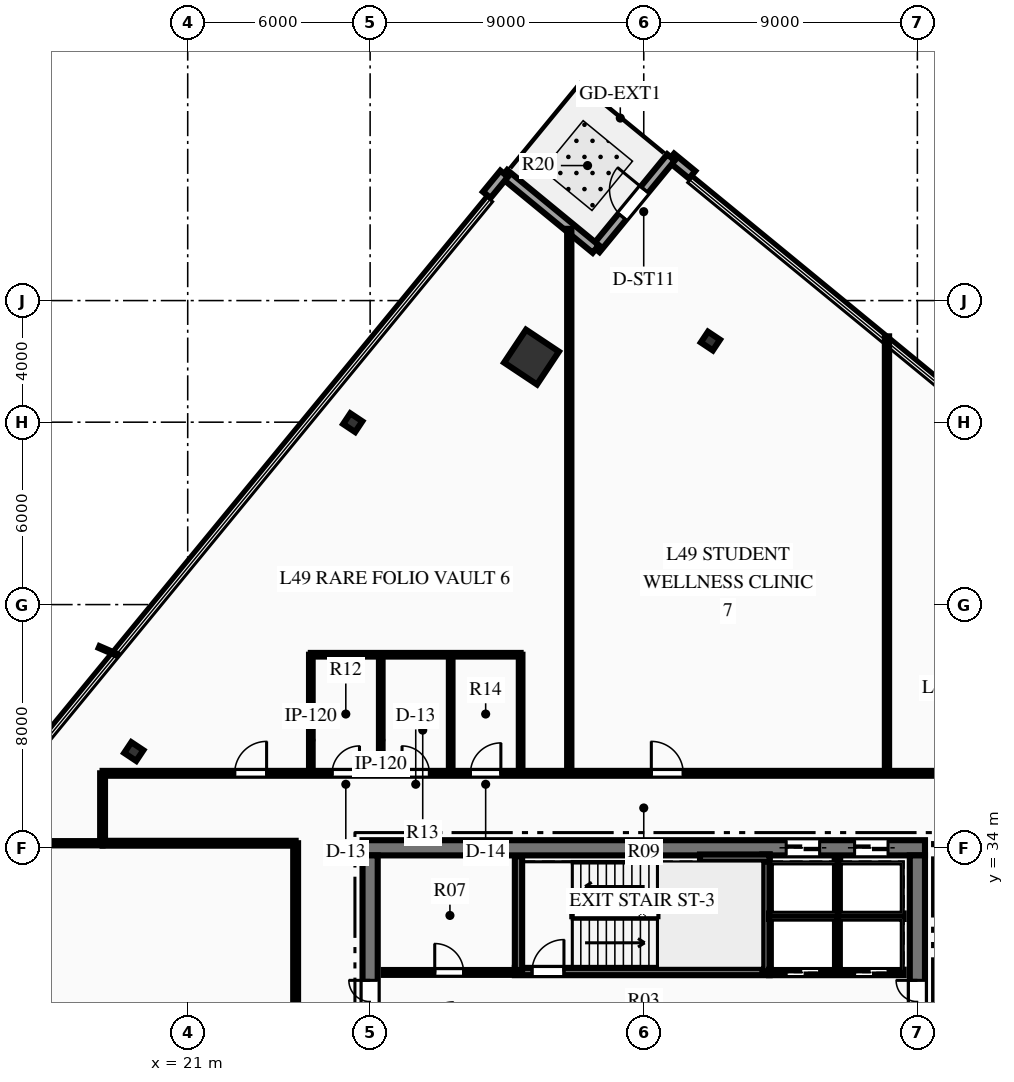
"""IFC4 building model, lengths in metres.
Left out: names, types, materials, properties, quantities, classifications, styles, units other than length and angle.
Written with IfcOpenShell. Run it as: python <this file> out.ifc"""

import sys

from ifc_helpers import new_model, si_unit, direction, frame, frame_2d, origin, origin_2d, place, context, subcontext, project, spatial, rectangle, hollow_rectangle, i_section, extrude, element, fill, save


model = new_model("IFC4")
c1 = context("Model", 3, precision=1e-05, world=origin(), true_north=direction((0.0, 1.0)))
c2 = subcontext(c1, "Body", "Model", "MODEL_VIEW")
j1 = project(units=[si_unit("LENGTHUNIT", "METRE"), si_unit("PLANEANGLEUNIT", "RADIAN")], contexts=[c1])
p1 = place(None, origin())
s1 = spatial("IfcSite", under=j1, at=p1, CompositionType="ELEMENT")
p2 = place(p1, origin())
s2 = spatial("IfcBuilding", under=s1, at=p2, CompositionType="ELEMENT")
p3 = place(p2, frame((0.0, 0.0, 198.45)))
s3 = spatial("IfcBuildingStorey", under=s2, at=p3, CompositionType="ELEMENT", Elevation=198.45)
p4 = place(p3, frame((26.75, 34.0, 0.0), z_axis=(0.0, 0.0, 1.0), x_axis=(1.0, 0.0, 0.0)))
e1 = element("IfcWall", 1, at=p4, inside=s3, PredefinedType="SHEAR", context=c2, shape_type="SweptSolid", body=[
    extrude(rectangle(XDim=18.5, YDim=0.5, at=frame_2d((9.25, 0.0))), origin(), (0.0, 0.0, 1.0), 3.75),
])
p5 = place(p4, frame((13.935, 0.0, 0.0)))
e2 = element("IfcOpeningElement", 2, at=p5, cuts=e1, PredefinedType="OPENING", context=c2, shape_type="SweptSolid", body=[
    extrude(rectangle(XDim=1.1, YDim=2.15, at=frame_2d((0.55, 1.075))), frame((0.0, 0.26, 0.0), z_axis=(0.0, -1.0, 0.0), x_axis=(1.0, 0.0, 0.0)), (0.0, 0.0, 1.0), 0.52),
])
p6 = place(p4, frame((16.185, 0.0, 0.0)))
e3 = element("IfcOpeningElement", 3, at=p6, cuts=e1, PredefinedType="OPENING", context=c2, shape_type="SweptSolid", body=[
    extrude(rectangle(XDim=1.1, YDim=2.15, at=frame_2d((0.55, 1.075))), frame((0.0, 0.26, 0.0), z_axis=(0.0, -1.0, 0.0), x_axis=(1.0, 0.0, 0.0)), (0.0, 0.0, 1.0), 0.52),
])
p7 = place(p3, frame((27.0, 18.25, 0.0), z_axis=(0.0, 0.0, 1.0), x_axis=(0.0, 1.0, 0.0)))
e4 = element("IfcWall", 4, at=p7, inside=s3, PredefinedType="SHEAR", context=c2, shape_type="SweptSolid", body=[
    extrude(rectangle(XDim=15.5, YDim=0.5, at=frame_2d((7.75, 0.0))), origin(), (0.0, 0.0, 1.0), 3.75),
])
p8 = place(p7, frame((9.99, 0.0, 0.0)))
e5 = element("IfcOpeningElement", 5, at=p8, cuts=e4, PredefinedType="OPENING", context=c2, shape_type="SweptSolid", body=[
    extrude(rectangle(XDim=1.4, YDim=2.2, at=frame_2d((0.7, 1.1))), frame((0.0, 0.26, 0.0), z_axis=(0.0, -1.0, 0.0), x_axis=(1.0, 0.0, 0.0)), (0.0, 0.0, 1.0), 0.52),
])
p9 = place(p3, frame((45.0, 18.25, 0.0), z_axis=(0.0, 0.0, 1.0), x_axis=(0.0, 1.0, 0.0)))
e6 = element("IfcWall", 6, at=p9, inside=s3, PredefinedType="SHEAR", context=c2, shape_type="SweptSolid", body=[
    extrude(rectangle(XDim=15.5, YDim=0.5, at=frame_2d((7.75, 0.0))), origin(), (0.0, 0.0, 1.0), 3.75),
])
p10 = place(p9, frame((9.99, 0.0, 0.0)))
e7 = element("IfcOpeningElement", 7, at=p10, cuts=e6, PredefinedType="OPENING", context=c2, shape_type="SweptSolid", body=[
    extrude(rectangle(XDim=1.4, YDim=2.2, at=frame_2d((0.7, 1.1))), frame((0.0, 0.26, 0.0), z_axis=(0.0, -1.0, 0.0), x_axis=(1.0, 0.0, 0.0)), (0.0, 0.0, 1.0), 0.52),
])
p11 = place(p3, frame((31.76, 29.93, 0.0), z_axis=(0.0, 0.0, 1.0), x_axis=(1.0, 0.0, 0.0)))
e8 = element("IfcWall", 8, at=p11, inside=s3, PredefinedType="SHEAR", context=c2, shape_type="SweptSolid", body=[
    extrude(rectangle(XDim=8.38, YDim=0.24, at=frame_2d((4.19, 0.0))), origin(), (0.0, 0.0, 1.0), 3.75),
])
p12 = place(p11, frame((0.565, 0.0, 0.0)))
e9 = element("IfcOpeningElement", 9, at=p12, cuts=e8, PredefinedType="OPENING", context=c2, shape_type="SweptSolid", body=[
    extrude(rectangle(XDim=1.05, YDim=2.15, at=frame_2d((0.525, 1.075))), frame((0.0, 0.13, 0.0), z_axis=(0.0, -1.0, 0.0), x_axis=(1.0, 0.0, 0.0)), (0.0, 0.0, 1.0), 0.26),
])
p13 = place(p3, frame((31.88, 29.93, 0.0), z_axis=(0.0, 0.0, 1.0), x_axis=(0.0, 1.0, 0.0)))
e10 = element("IfcWall", 10, at=p13, inside=s3, PredefinedType="SHEAR", context=c2, shape_type="SweptSolid", body=[
    extrude(rectangle(XDim=3.79, YDim=0.24, at=frame_2d((1.895, 0.0))), origin(), (0.0, 0.0, 1.0), 3.75),
])
p14 = place(p3, frame((40.02, 29.93, 0.0), z_axis=(0.0, 0.0, 1.0), x_axis=(0.0, 1.0, 0.0)))
e11 = element("IfcWall", 11, at=p14, inside=s3, PredefinedType="SHEAR", context=c2, shape_type="SweptSolid", body=[
    extrude(rectangle(XDim=3.85, YDim=0.24, at=frame_2d((1.925, 0.0))), origin(), (0.0, 0.0, 1.0), 3.75),
])
p15 = place(p3, frame((37.85, 33.66, 0.0), z_axis=(0.0, 0.0, 1.0), x_axis=(1.0, 0.0, 0.0)))
e12 = element("IfcWall", 12, at=p15, inside=s3, PredefinedType="SHEAR", context=c2, shape_type="SweptSolid", body=[
    extrude(rectangle(XDim=2.29, YDim=0.24, at=frame_2d((1.145, 0.0))), origin(), (0.0, 0.0, 1.0), 3.75),
])
p16 = place(p3, frame((32.308, 50.141, 0.0), z_axis=(0.0, 0.0, 1.0), x_axis=(0.554118199338, 0.832437998389, 0.0)))
e13 = element("IfcColumn", 13, at=p16, inside=s3, PredefinedType="COLUMN", context=c2, shape_type="SweptSolid", body=[
    extrude(hollow_rectangle(XDim=1.3, YDim=1.3, WallThickness=0.06, at=origin_2d()), origin(), (0.0, 0.0, 1.0), 3.75),
])
for number, where, z_axis, x_axis in (
    (14, (38.193, 50.668, 0.0), (0.0, 0.0, 1.0), (0.554, 0.832, 0.0)),
    (15, (26.428, 47.984, 0.0), (0.0, 0.0, 1.0), (0.554, 0.832, 0.0)),
    (16, (19.226, 37.166, 0.0), (0.0, 0.0, 1.0), (0.554, 0.832, 0.0)),
):
    element("IfcColumn", number, at=place(p3, frame(where, z_axis=z_axis, x_axis=x_axis)), inside=s3, PredefinedType="COLUMN", context=c2, shape_type="SweptSolid", body=[
        extrude(i_section(OverallWidth=0.424, OverallDepth=0.474, WebThickness=0.048, FlangeThickness=0.077, at=origin_2d()), origin(), (0.0, 0.0, 1.0), 3.75),
    ])
p17 = place(p3, frame((36.896, 56.71, 0.0), z_axis=(0.0, 0.0, 1.0), x_axis=(0.772759512761, -0.63469893291, 0.0)))
e17 = element("IfcWall", 17, at=p17, inside=s3, PredefinedType="STANDARD", context=c2, shape_type="SweptSolid", body=[
    extrude(rectangle(XDim=0.9, YDim=0.32, at=frame_2d((0.45, 0.0))), origin(), (0.0, 0.0, 1.0), 3.47),
])
p18 = place(p3, frame((34.421, 53.697, 0.0), z_axis=(0.0, 0.0, 1.0), x_axis=(0.634712723343, 0.77274818591, 0.0)))
e18 = element("IfcWall", 18, at=p18, inside=s3, PredefinedType="STANDARD", context=c2, shape_type="SweptSolid", body=[
    extrude(rectangle(XDim=3.9, YDim=0.32, at=frame_2d((1.95, 0.0))), origin(), (0.0, 0.0, 1.0), 3.47),
])
p19 = place(p18, frame((1.375, 0.0, 0.0)))
e19 = element("IfcOpeningElement", 19, at=p19, cuts=e18, PredefinedType="OPENING", context=c2, shape_type="SweptSolid", body=[
    extrude(rectangle(XDim=1.15, YDim=2.2, at=frame_2d((0.575, 1.1))), frame((0.0, 0.17, 0.0), z_axis=(0.0, -1.0, 0.0), x_axis=(1.0, 0.0, 0.0)), (0.0, 0.0, 1.0), 0.34),
])
p20 = place(p3, frame((31.407, 56.172, 0.0), z_axis=(0.0, 0.0, 1.0), x_axis=(0.77274818591, -0.634712723343, 0.0)))
e20 = element("IfcWall", 20, at=p20, inside=s3, PredefinedType="STANDARD", context=c2, shape_type="SweptSolid", body=[
    extrude(rectangle(XDim=3.9, YDim=0.32, at=frame_2d((1.95, 0.0))), origin(), (0.0, 0.0, 1.0), 3.47),
])
p21 = place(p3, frame((30.836, 55.477, 0.0), z_axis=(0.0, 0.0, 1.0), x_axis=(0.63469893291, 0.772759512761, 0.0)))
e21 = element("IfcWall", 21, at=p21, inside=s3, PredefinedType="STANDARD", context=c2, shape_type="SweptSolid", body=[
    extrude(rectangle(XDim=0.9, YDim=0.32, at=frame_2d((0.45, 0.0))), origin(), (0.0, 0.0, 1.0), 3.47),
])
p22 = place(p3, frame((27.45, 29.9, 0.0), z_axis=(0.0, 0.0, 1.0), x_axis=(1.0, 0.0, 0.0)))
e22 = element("IfcWall", 22, at=p22, inside=s3, PredefinedType="PARTITIONING", context=c2, shape_type="SweptSolid", body=[
    extrude(rectangle(XDim=4.43, YDim=0.16, at=frame_2d((2.215, 0.0))), origin(), (0.0, 0.0, 1.0), 3.47),
])
p23 = place(p22, frame((1.675, 0.0, 0.0)))
e23 = element("IfcOpeningElement", 23, at=p23, cuts=e22, PredefinedType="OPENING", context=c2, shape_type="SweptSolid", body=[
    extrude(rectangle(XDim=0.95, YDim=2.15, at=frame_2d((0.475, 1.075))), frame((0.0, 0.09, 0.0), z_axis=(0.0, -1.0, 0.0), x_axis=(1.0, 0.0, 0.0)), (0.0, 0.0, 1.0), 0.18),
])
p24 = place(p3, frame((40.12, 29.9, 0.0), z_axis=(0.0, 0.0, 1.0), x_axis=(1.0, 0.0, 0.0)))
e24 = element("IfcWall", 24, at=p24, inside=s3, PredefinedType="PARTITIONING", context=c2, shape_type="SweptSolid", body=[
    extrude(rectangle(XDim=4.43, YDim=0.18, at=frame_2d((2.215, 0.0))), origin(), (0.0, 0.0, 1.0), 3.47),
])
p25 = place(p24, frame((0.565, 0.0, 0.0)))
e25 = element("IfcOpeningElement", 25, at=p25, cuts=e24, PredefinedType="OPENING", context=c2, shape_type="SweptSolid", body=[
    extrude(rectangle(XDim=1.1, YDim=2.15, at=frame_2d((0.55, 1.075))), frame((0.0, 0.1, 0.0), z_axis=(0.0, -1.0, 0.0), x_axis=(1.0, 0.0, 0.0)), (0.0, 0.0, 1.0), 0.2),
])
p26 = place(p24, frame((2.815, 0.0, 0.0)))
e26 = element("IfcOpeningElement", 26, at=p26, cuts=e24, PredefinedType="OPENING", context=c2, shape_type="SweptSolid", body=[
    extrude(rectangle(XDim=1.1, YDim=2.15, at=frame_2d((0.55, 1.075))), frame((0.0, 0.1, 0.0), z_axis=(0.0, -1.0, 0.0), x_axis=(1.0, 0.0, 0.0)), (0.0, 0.0, 1.0), 0.2),
])
p27 = place(p3, frame((40.12, 31.75, 0.0), z_axis=(0.0, 0.0, 1.0), x_axis=(1.0, 0.0, 0.0)))
e27 = element("IfcWall", 27, at=p27, inside=s3, PredefinedType="PARTITIONING", context=c2, shape_type="SweptSolid", body=[
    extrude(rectangle(XDim=4.43, YDim=0.18, at=frame_2d((2.215, 0.0))), origin(), (0.0, 0.0, 1.0), 3.47),
])
p28 = place(p3, frame((42.37, 29.9, 0.0), z_axis=(0.0, 0.0, 1.0), x_axis=(0.0, 1.0, 0.0)))
e28 = element("IfcWall", 28, at=p28, inside=s3, PredefinedType="PARTITIONING", context=c2, shape_type="SweptSolid", body=[
    extrude(rectangle(XDim=3.75, YDim=0.18, at=frame_2d((1.875, 0.0))), origin(), (0.0, 0.0, 1.0), 3.47),
])
p29 = place(p3, frame((18.2, 36.45, 0.0), z_axis=(0.0, 0.0, 1.0), x_axis=(1.0, 0.0, 0.0)))
e29 = element("IfcWall", 29, at=p29, inside=s3, PredefinedType="PARTITIONING", context=c2, shape_type="SweptSolid", body=[
    extrude(rectangle(XDim=35.6, YDim=0.16, at=frame_2d((17.8, 0.0))), origin(), (0.0, 0.0, 1.0), 2.849),
])
p30 = place(p29, frame((7.55, 0.0, 0.0)))
e30 = element("IfcOpeningElement", 30, at=p30, cuts=e29, PredefinedType="OPENING", context=c2, shape_type="SweptSolid", body=[
    extrude(rectangle(XDim=0.9, YDim=2.15, at=frame_2d((0.45, 1.075))), frame((0.0, 0.09, 0.0), z_axis=(0.0, -1.0, 0.0), x_axis=(1.0, 0.0, 0.0)), (0.0, 0.0, 1.0), 0.18),
])
p31 = place(p29, frame((9.85, 0.0, 0.0)))
e31 = element("IfcOpeningElement", 31, at=p31, cuts=e29, PredefinedType="OPENING", context=c2, shape_type="SweptSolid", body=[
    extrude(rectangle(XDim=0.9, YDim=2.15, at=frame_2d((0.45, 1.075))), frame((0.0, 0.09, 0.0), z_axis=(0.0, -1.0, 0.0), x_axis=(1.0, 0.0, 0.0)), (0.0, 0.0, 1.0), 0.18),
])
p32 = place(p29, frame((12.1, 0.0, 0.0)))
e32 = element("IfcOpeningElement", 32, at=p32, cuts=e29, PredefinedType="OPENING", context=c2, shape_type="SweptSolid", body=[
    extrude(rectangle(XDim=1.0, YDim=2.15, at=frame_2d((0.5, 1.075))), frame((0.0, 0.09, 0.0), z_axis=(0.0, -1.0, 0.0), x_axis=(1.0, 0.0, 0.0)), (0.0, 0.0, 1.0), 0.18),
])
p33 = place(p29, frame((4.345, 0.0, 0.0)))
e33 = element("IfcOpeningElement", 33, at=p33, cuts=e29, PredefinedType="OPENING", context=c2, shape_type="SweptSolid", body=[
    extrude(rectangle(XDim=1.05, YDim=2.15, at=frame_2d((0.525, 1.075))), frame((0.0, 0.09, 0.0), z_axis=(0.0, -1.0, 0.0), x_axis=(1.0, 0.0, 0.0)), (0.0, 0.0, 1.0), 0.18),
])
p34 = place(p29, frame((18.049, 0.0, 0.0)))
e34 = element("IfcOpeningElement", 34, at=p34, cuts=e29, PredefinedType="OPENING", context=c2, shape_type="SweptSolid", body=[
    extrude(rectangle(XDim=1.05, YDim=2.15, at=frame_2d((0.525, 1.075))), frame((0.0, 0.09, 0.0), z_axis=(0.0, -1.0, 0.0), x_axis=(1.0, 0.0, 0.0)), (0.0, 0.0, 1.0), 0.18),
])
p35 = place(p29, frame((31.833, 0.0, 0.0)))
e35 = element("IfcOpeningElement", 35, at=p35, cuts=e29, PredefinedType="OPENING", context=c2, shape_type="SweptSolid", body=[
    extrude(rectangle(XDim=1.05, YDim=2.15, at=frame_2d((0.525, 1.075))), frame((0.0, 0.09, 0.0), z_axis=(0.0, -1.0, 0.0), x_axis=(1.0, 0.0, 0.0)), (0.0, 0.0, 1.0), 0.18),
])
p36 = place(p3, frame((18.2, 34.15, 0.0), z_axis=(0.0, 0.0, 1.0), x_axis=(1.0, 0.0, 0.0)))
e36 = element("IfcWall", 36, at=p36, inside=s3, PredefinedType="PARTITIONING", context=c2, shape_type="SweptSolid", body=[
    extrude(rectangle(XDim=6.35, YDim=0.16, at=frame_2d((3.175, 0.0))), origin(), (0.0, 0.0, 1.0), 3.47),
])
p37 = place(p3, frame((24.55, 17.85, 0.0), z_axis=(0.0, 0.0, 1.0), x_axis=(0.0, 1.0, 0.0)))
e37 = element("IfcWall", 37, at=p37, inside=s3, PredefinedType="PARTITIONING", context=c2, shape_type="SweptSolid", body=[
    extrude(rectangle(XDim=16.3, YDim=0.16, at=frame_2d((8.15, 0.0))), origin(), (0.0, 0.0, 1.0), 3.47),
])
p38 = place(p37, frame((2.775, 0.0, 0.0)))
e38 = element("IfcOpeningElement", 38, at=p38, cuts=e37, PredefinedType="OPENING", context=c2, shape_type="SweptSolid", body=[
    extrude(rectangle(XDim=0.95, YDim=2.15, at=frame_2d((0.475, 1.075))), frame((0.0, 0.09, 0.0), z_axis=(0.0, -1.0, 0.0), x_axis=(1.0, 0.0, 0.0)), (0.0, 0.0, 1.0), 0.18),
])
p39 = place(p37, frame((8.729, 0.0, 0.0)))
e39 = element("IfcOpeningElement", 39, at=p39, cuts=e37, PredefinedType="OPENING", context=c2, shape_type="SweptSolid", body=[
    extrude(rectangle(XDim=1.05, YDim=2.15, at=frame_2d((0.525, 1.075))), frame((0.0, 0.09, 0.0), z_axis=(0.0, -1.0, 0.0), x_axis=(1.0, 0.0, 0.0)), (0.0, 0.0, 1.0), 0.18),
])
p40 = place(p3, frame((18.2, 34.15, 0.0), z_axis=(0.0, 0.0, 1.0), x_axis=(0.0, 1.0, 0.0)))
e40 = element("IfcWall", 40, at=p40, inside=s3, PredefinedType="PARTITIONING", context=c2, shape_type="SweptSolid", body=[
    extrude(rectangle(XDim=2.3, YDim=0.16, at=frame_2d((1.15, 0.0))), origin(), (0.0, 0.0, 1.0), 3.47),
])
for number, where, z_axis, x_axis in (
    (41, (25.05, 36.45, 0.0), (0.0, 0.0, 1.0), (0.0, 1.0, 0.0)),
    (42, (27.35, 36.45, 0.0), (0.0, 0.0, 1.0), (0.0, 1.0, 0.0)),
    (43, (29.65, 36.45, 0.0), (0.0, 0.0, 1.0), (0.0, 1.0, 0.0)),
):
    element("IfcWall", number, at=place(p3, frame(where, z_axis=z_axis, x_axis=x_axis)), inside=s3, PredefinedType="PARTITIONING", context=c2, shape_type="SweptSolid", body=[
        extrude(rectangle(XDim=3.9, YDim=0.12, at=frame_2d((1.95, 0.0))), origin(), (0.0, 0.0, 1.0), 3.47),
    ])
p41 = place(p3, frame((31.95, 36.45, 0.0), z_axis=(0.0, 0.0, 1.0), x_axis=(0.0, 1.0, 0.0)))
e44 = element("IfcWall", 44, at=p41, inside=s3, PredefinedType="PARTITIONING", context=c2, shape_type="SweptSolid", body=[
    extrude(rectangle(XDim=3.9, YDim=0.12, at=frame_2d((1.95, 0.0))), origin(), (0.0, 0.0, 1.0), 2.849),
])
p42 = place(p3, frame((25.05, 40.35, 0.0), z_axis=(0.0, 0.0, 1.0), x_axis=(1.0, 0.0, 0.0)))
e45 = element("IfcWall", 45, at=p42, inside=s3, PredefinedType="PARTITIONING", context=c2, shape_type="SweptSolid", body=[
    extrude(rectangle(XDim=6.9, YDim=0.12, at=frame_2d((3.45, 0.0))), origin(), (0.0, 0.0, 1.0), 3.47),
])
p43 = place(p3, frame((13.37, 34.15, 0.0), z_axis=(0.0, 0.0, 1.0), x_axis=(1.0, 0.0, 0.0)))
e46 = element("IfcWall", 46, at=p43, inside=s3, PredefinedType="PARTITIONING", context=c2, shape_type="SweptSolid", body=[
    extrude(rectangle(XDim=4.83, YDim=0.14, at=frame_2d((2.415, 0.0))), origin(), (0.0, 0.0, 1.0), 3.47),
])
p44 = place(p3, frame((33.55, 36.45, 0.0), z_axis=(0.0, 0.0, 1.0), x_axis=(0.0, 1.0, 0.0)))
e47 = element("IfcWall", 47, at=p44, inside=s3, PredefinedType="PARTITIONING", context=c2, shape_type="SweptSolid", body=[
    extrude(rectangle(XDim=17.911, YDim=0.14, at=frame_2d((8.955, 0.0))), origin(), (0.0, 0.0, 1.0), 3.47),
])
p45 = place(p3, frame((44.0, 36.45, 0.0), z_axis=(0.0, 0.0, 1.0), x_axis=(0.0, 1.0, 0.0)))
e48 = element("IfcWall", 48, at=p45, inside=s3, PredefinedType="PARTITIONING", context=c2, shape_type="SweptSolid", body=[
    extrude(rectangle(XDim=14.374, YDim=0.14, at=frame_2d((7.187, 0.0))), origin(), (0.0, 0.0, 1.0), 3.47),
])
p46 = place(p19, origin())
e49 = element("IfcDoor", 49, at=p46, inside=s3, OperationType="SINGLE_SWING_RIGHT", PredefinedType="DOOR", context=c2, shape_type="SweptSolid", body=[
    extrude(rectangle(XDim=1.15, YDim=2.2, at=frame_2d((0.575, 1.1))), frame((0.0, 0.025, 0.0), z_axis=(0.0, -1.0, 0.0), x_axis=(1.0, 0.0, 0.0)), (0.0, 0.0, 1.0), 0.05),
])
fill(e19, e49)
p47 = place(p23, origin())
e50 = element("IfcDoor", 50, at=p47, inside=s3, OperationType="SINGLE_SWING_LEFT", PredefinedType="DOOR", context=c2, shape_type="SweptSolid", body=[
    extrude(rectangle(XDim=0.95, YDim=2.15, at=frame_2d((0.475, 1.075))), frame((0.0, 0.025, 0.0), z_axis=(0.0, -1.0, 0.0), x_axis=(1.0, 0.0, 0.0)), (0.0, 0.0, 1.0), 0.05),
])
fill(e23, e50)
p48 = place(p12, origin())
e51 = element("IfcDoor", 51, at=p48, inside=s3, OperationType="SINGLE_SWING_RIGHT", PredefinedType="DOOR", context=c2, shape_type="SweptSolid", body=[
    extrude(rectangle(XDim=1.05, YDim=2.15, at=frame_2d((0.525, 1.075))), frame((0.0, 0.025, 0.0), z_axis=(0.0, -1.0, 0.0), x_axis=(1.0, 0.0, 0.0)), (0.0, 0.0, 1.0), 0.05),
])
fill(e9, e51)
p49 = place(p8, origin())
e52 = element("IfcDoor", 52, at=p49, inside=s3, OperationType="DOUBLE_DOOR_SINGLE_SWING", PredefinedType="DOOR", context=c2, shape_type="SweptSolid", body=[
    extrude(rectangle(XDim=1.4, YDim=2.2, at=frame_2d((0.7, 1.1))), frame((0.0, 0.025, 0.0), z_axis=(0.0, -1.0, 0.0), x_axis=(1.0, 0.0, 0.0)), (0.0, 0.0, 1.0), 0.05),
])
fill(e5, e52)
p50 = place(p10, origin())
e53 = element("IfcDoor", 53, at=p50, inside=s3, OperationType="DOUBLE_DOOR_SINGLE_SWING", PredefinedType="DOOR", context=c2, shape_type="SweptSolid", body=[
    extrude(rectangle(XDim=1.4, YDim=2.2, at=frame_2d((0.7, 1.1))), frame((0.0, 0.025, 0.0), z_axis=(0.0, -1.0, 0.0), x_axis=(1.0, 0.0, 0.0)), (0.0, 0.0, 1.0), 0.05),
])
fill(e7, e53)
p51 = place(p30, origin())
e54 = element("IfcDoor", 54, at=p51, inside=s3, OperationType="SINGLE_SWING_RIGHT", PredefinedType="DOOR", context=c2, shape_type="SweptSolid", body=[
    extrude(rectangle(XDim=0.9, YDim=2.15, at=frame_2d((0.45, 1.075))), frame((0.0, 0.025, 0.0), z_axis=(0.0, -1.0, 0.0), x_axis=(1.0, 0.0, 0.0)), (0.0, 0.0, 1.0), 0.05),
])
fill(e30, e54)
p52 = place(p31, origin())
e55 = element("IfcDoor", 55, at=p52, inside=s3, OperationType="SINGLE_SWING_LEFT", PredefinedType="DOOR", context=c2, shape_type="SweptSolid", body=[
    extrude(rectangle(XDim=0.9, YDim=2.15, at=frame_2d((0.45, 1.075))), frame((0.0, 0.025, 0.0), z_axis=(0.0, -1.0, 0.0), x_axis=(1.0, 0.0, 0.0)), (0.0, 0.0, 1.0), 0.05),
])
fill(e31, e55)
p53 = place(p32, origin())
e56 = element("IfcDoor", 56, at=p53, inside=s3, OperationType="SINGLE_SWING_RIGHT", PredefinedType="DOOR", context=c2, shape_type="SweptSolid", body=[
    extrude(rectangle(XDim=1.0, YDim=2.15, at=frame_2d((0.5, 1.075))), frame((0.0, 0.025, 0.0), z_axis=(0.0, -1.0, 0.0), x_axis=(1.0, 0.0, 0.0)), (0.0, 0.0, 1.0), 0.05),
])
fill(e32, e56)
p54 = place(p33, origin())
e57 = element("IfcDoor", 57, at=p54, inside=s3, OperationType="SINGLE_SWING_RIGHT", PredefinedType="DOOR", context=c2, shape_type="SweptSolid", body=[
    extrude(rectangle(XDim=1.05, YDim=2.15, at=frame_2d((0.525, 1.075))), frame((0.0, 0.025, 0.0), z_axis=(0.0, -1.0, 0.0), x_axis=(1.0, 0.0, 0.0)), (0.0, 0.0, 1.0), 0.05),
])
fill(e33, e57)
p55 = place(p34, origin())
e58 = element("IfcDoor", 58, at=p55, inside=s3, OperationType="SINGLE_SWING_LEFT", PredefinedType="DOOR", context=c2, shape_type="SweptSolid", body=[
    extrude(rectangle(XDim=1.05, YDim=2.15, at=frame_2d((0.525, 1.075))), frame((0.0, 0.025, 0.0), z_axis=(0.0, -1.0, 0.0), x_axis=(1.0, 0.0, 0.0)), (0.0, 0.0, 1.0), 0.05),
])
fill(e34, e58)
p56 = place(p25, origin())
e59 = element("IfcDoor", 59, at=p56, inside=s3, OperationType="SLIDING_TO_LEFT", PredefinedType="DOOR", context=c2, shape_type="SweptSolid", body=[
    extrude(rectangle(XDim=1.1, YDim=2.15, at=frame_2d((0.55, 1.075))), frame((0.0, 0.025, 0.0), z_axis=(0.0, -1.0, 0.0), x_axis=(1.0, 0.0, 0.0)), (0.0, 0.0, 1.0), 0.05),
])
fill(e25, e59)
p57 = place(p26, origin())
e60 = element("IfcDoor", 60, at=p57, inside=s3, OperationType="SLIDING_TO_LEFT", PredefinedType="DOOR", context=c2, shape_type="SweptSolid", body=[
    extrude(rectangle(XDim=1.1, YDim=2.15, at=frame_2d((0.55, 1.075))), frame((0.0, 0.025, 0.0), z_axis=(0.0, -1.0, 0.0), x_axis=(1.0, 0.0, 0.0)), (0.0, 0.0, 1.0), 0.05),
])
fill(e26, e60)
p58 = place(p5, origin())
e61 = element("IfcDoor", 61, at=p58, inside=s3, OperationType="SLIDING_TO_LEFT", PredefinedType="DOOR", context=c2, shape_type="SweptSolid", body=[
    extrude(rectangle(XDim=1.1, YDim=2.15, at=frame_2d((0.55, 1.075))), frame((0.0, 0.025, 0.0), z_axis=(0.0, -1.0, 0.0), x_axis=(1.0, 0.0, 0.0)), (0.0, 0.0, 1.0), 0.05),
])
fill(e2, e61)
p59 = place(p6, origin())
e62 = element("IfcDoor", 62, at=p59, inside=s3, OperationType="SLIDING_TO_LEFT", PredefinedType="DOOR", context=c2, shape_type="SweptSolid", body=[
    extrude(rectangle(XDim=1.1, YDim=2.15, at=frame_2d((0.55, 1.075))), frame((0.0, 0.025, 0.0), z_axis=(0.0, -1.0, 0.0), x_axis=(1.0, 0.0, 0.0)), (0.0, 0.0, 1.0), 0.05),
])
fill(e3, e62)
save(model, sys.argv[1])
